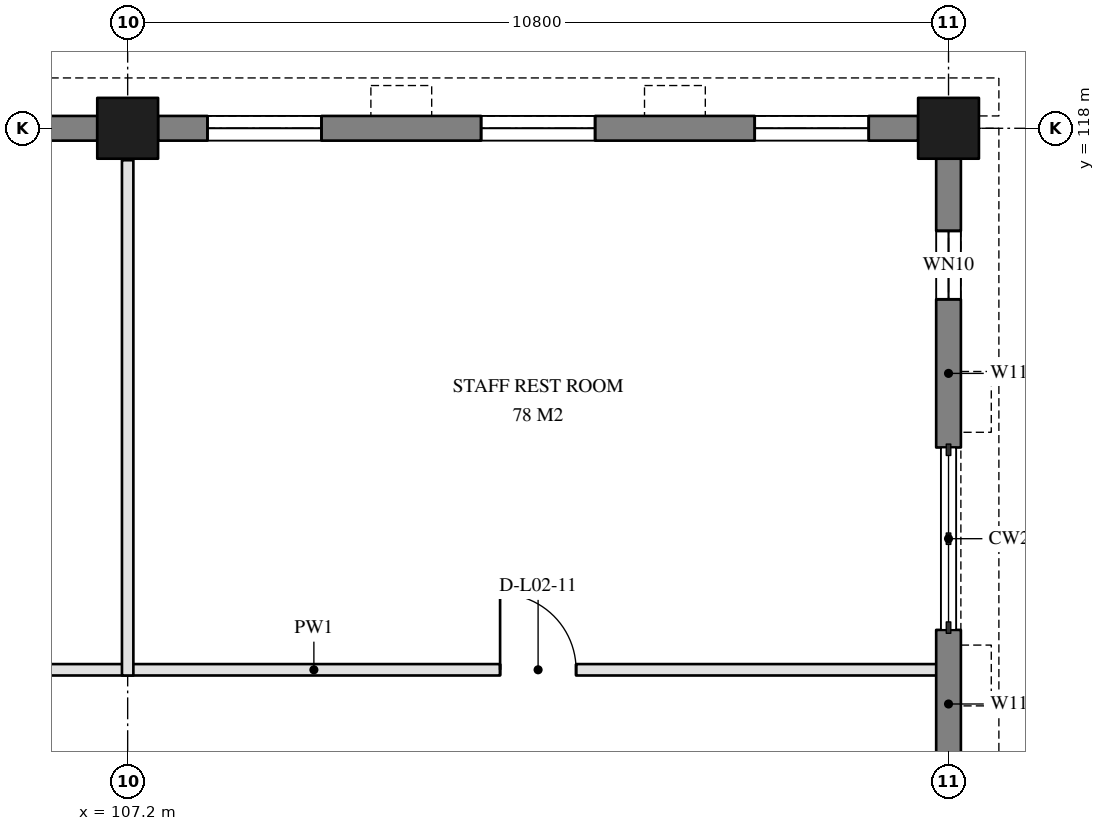
"""IFC4 building model, lengths in metres.
Left out: names, types, materials, properties, quantities, classifications, styles, units other than length and angle.
Written with IfcOpenShell. Run it as: python <this file> out.ifc"""

import sys

from ifc_helpers import new_model, si_unit, direction, frame, frame_2d, origin, origin_2d, place, context, subcontext, project, spatial, rectangle, extrude, element, fill, save


model = new_model("IFC4")
c1 = context("Model", 3, precision=1e-05, world=origin(), true_north=direction((0.0, 1.0)))
c2 = subcontext(c1, "Body", "Model", "MODEL_VIEW")
j1 = project(units=[si_unit("LENGTHUNIT", "METRE"), si_unit("PLANEANGLEUNIT", "RADIAN")], contexts=[c1])
p1 = place(None, origin())
s1 = spatial("IfcSite", under=j1, at=p1, CompositionType="ELEMENT")
p2 = place(p1, origin())
s2 = spatial("IfcBuilding", under=s1, at=p2, CompositionType="ELEMENT")
p3 = place(p2, frame((0.0, 0.0, 8.7)))
s3 = spatial("IfcBuildingStorey", under=s2, at=p3, CompositionType="ELEMENT", Elevation=8.7)
for number, where, z_axis, x_axis in (
    (1, (107.2, 118.0, 0.0), (0.0, 0.0, 1.0), (1.0, 0.0, 0.0)),
    (2, (118.0, 118.0, 0.0), (0.0, 0.0, 1.0), (1.0, 0.0, 0.0)),
):
    element("IfcColumn", number, at=place(p3, frame(where, z_axis=z_axis, x_axis=x_axis)), inside=s3, PredefinedType="COLUMN", context=c2, shape_type="SweptSolid", body=[
        extrude(rectangle(XDim=0.8, YDim=0.8, at=origin_2d()), origin(), (0.0, 0.0, 1.0), 3.9),
    ])
p4 = place(p3, frame((103.0, 118.0, 0.0), z_axis=(0.0, 0.0, 1.0), x_axis=(1.0, 0.0, 0.0)))
e3 = element("IfcWall", 3, at=p4, inside=s3, PredefinedType="SOLIDWALL", context=c2, shape_type="SweptSolid", body=[
    extrude(rectangle(XDim=3.8, YDim=0.325, at=frame_2d((1.9, 0.0))), origin(), (0.0, 0.0, 1.0), 2.8),
])
p5 = place(p4, frame((1.65, 0.0, 0.6)))
e4 = element("IfcOpeningElement", 4, at=p5, cuts=e3, PredefinedType="OPENING", context=c2, shape_type="SweptSolid", body=[
    extrude(rectangle(XDim=1.5, YDim=2.1, at=frame_2d((0.75, 1.05))), frame((0.0, 0.172, 0.0), z_axis=(0.0, -1.0, 0.0), x_axis=(1.0, 0.0, 0.0)), (0.0, 0.0, 1.0), 0.345),
])
p6 = place(p3, frame((107.6, 118.0, 0.0), z_axis=(0.0, 0.0, 1.0), x_axis=(1.0, 0.0, 0.0)))
e5 = element("IfcWall", 5, at=p6, inside=s3, PredefinedType="SOLIDWALL", context=c2, shape_type="SweptSolid", body=[
    extrude(rectangle(XDim=10.0, YDim=0.325, at=frame_2d((5.0, 0.0))), origin(), (0.0, 0.0, 1.0), 2.8),
])
p7 = place(p6, frame((0.65, 0.0, 0.6)))
e6 = element("IfcOpeningElement", 6, at=p7, cuts=e5, PredefinedType="OPENING", context=c2, shape_type="SweptSolid", body=[
    extrude(rectangle(XDim=1.5, YDim=2.1, at=frame_2d((0.75, 1.05))), frame((0.0, 0.172, 0.0), z_axis=(0.0, -1.0, 0.0), x_axis=(1.0, 0.0, 0.0)), (0.0, 0.0, 1.0), 0.345),
])
p8 = place(p6, frame((4.25, 0.0, 0.6)))
e7 = element("IfcOpeningElement", 7, at=p8, cuts=e5, PredefinedType="OPENING", context=c2, shape_type="SweptSolid", body=[
    extrude(rectangle(XDim=1.5, YDim=2.1, at=frame_2d((0.75, 1.05))), frame((0.0, 0.172, 0.0), z_axis=(0.0, -1.0, 0.0), x_axis=(1.0, 0.0, 0.0)), (0.0, 0.0, 1.0), 0.345),
])
p9 = place(p6, frame((7.85, 0.0, 0.6)))
e8 = element("IfcOpeningElement", 8, at=p9, cuts=e5, PredefinedType="OPENING", context=c2, shape_type="SweptSolid", body=[
    extrude(rectangle(XDim=1.5, YDim=2.1, at=frame_2d((0.75, 1.05))), frame((0.0, 0.172, 0.0), z_axis=(0.0, -1.0, 0.0), x_axis=(1.0, 0.0, 0.0)), (0.0, 0.0, 1.0), 0.345),
])
p10 = place(p3, frame((118.0, 107.6, 0.0), z_axis=(0.0, 0.0, 1.0), x_axis=(0.0, 1.0, 0.0)))
e9 = element("IfcWall", 9, at=p10, inside=s3, PredefinedType="SOLIDWALL", context=c2, shape_type="SweptSolid", body=[
    extrude(rectangle(XDim=3.8, YDim=0.325, at=frame_2d((1.9, 0.0))), origin(), (0.0, 0.0, 1.0), 2.8),
])
p11 = place(p10, frame((0.95, 0.0, 0.7)))
e10 = element("IfcOpeningElement", 10, at=p11, cuts=e9, PredefinedType="OPENING", context=c2, shape_type="SweptSolid", body=[
    extrude(rectangle(XDim=0.9, YDim=2.0, at=frame_2d((0.45, 1.0))), frame((0.0, 0.172, 0.0), z_axis=(0.0, -1.0, 0.0), x_axis=(1.0, 0.0, 0.0)), (0.0, 0.0, 1.0), 0.345),
])
p12 = place(p3, frame((118.0, 113.8, 0.0), z_axis=(0.0, 0.0, 1.0), x_axis=(0.0, 1.0, 0.0)))
e11 = element("IfcWall", 11, at=p12, inside=s3, PredefinedType="SOLIDWALL", context=c2, shape_type="SweptSolid", body=[
    extrude(rectangle(XDim=3.8, YDim=0.325, at=frame_2d((1.9, 0.0))), origin(), (0.0, 0.0, 1.0), 2.8),
])
p13 = place(p12, frame((1.95, 0.0, 0.7)))
e12 = element("IfcOpeningElement", 12, at=p13, cuts=e11, PredefinedType="OPENING", context=c2, shape_type="SweptSolid", body=[
    extrude(rectangle(XDim=0.9, YDim=2.0, at=frame_2d((0.45, 1.0))), frame((0.0, 0.172, 0.0), z_axis=(0.0, -1.0, 0.0), x_axis=(1.0, 0.0, 0.0)), (0.0, 0.0, 1.0), 0.345),
])
p14 = place(p3, frame((92.8, 110.875, 0.0), z_axis=(0.0, 0.0, 1.0), x_axis=(1.0, 0.0, 0.0)))
e13 = element("IfcWall", 13, at=p14, inside=s3, PredefinedType="PARTITIONING", context=c2, shape_type="SweptSolid", body=[
    extrude(rectangle(XDim=14.4, YDim=0.15, at=frame_2d((7.2, 0.0))), origin(), (0.0, 0.0, 1.0), 2.8),
])
p15 = place(p14, frame((6.3, 0.0, 0.0)))
e14 = element("IfcOpeningElement", 14, at=p15, cuts=e13, PredefinedType="OPENING", context=c2, shape_type="SweptSolid", body=[
    extrude(rectangle(XDim=1.8, YDim=2.1, at=frame_2d((0.9, 1.05))), frame((0.0, 0.085, 0.0), z_axis=(0.0, -1.0, 0.0), x_axis=(1.0, 0.0, 0.0)), (0.0, 0.0, 1.0), 0.17),
])
p16 = place(p3, frame((107.2, 110.875, 0.0), z_axis=(0.0, 0.0, 1.0), x_axis=(1.0, 0.0, 0.0)))
e15 = element("IfcWall", 15, at=p16, inside=s3, PredefinedType="PARTITIONING", context=c2, shape_type="SweptSolid", body=[
    extrude(rectangle(XDim=10.8, YDim=0.15, at=frame_2d((5.4, 0.0))), origin(), (0.0, 0.0, 1.0), 2.8),
])
p17 = place(p16, frame((4.9, 0.0, 0.0)))
e16 = element("IfcOpeningElement", 16, at=p17, cuts=e15, PredefinedType="OPENING", context=c2, shape_type="SweptSolid", body=[
    extrude(rectangle(XDim=1.0, YDim=2.1, at=frame_2d((0.5, 1.05))), frame((0.0, 0.085, 0.0), z_axis=(0.0, -1.0, 0.0), x_axis=(1.0, 0.0, 0.0)), (0.0, 0.0, 1.0), 0.17),
])
p18 = place(p3, frame((107.2, 110.8, 0.0), z_axis=(0.0, 0.0, 1.0), x_axis=(0.0, 1.0, 0.0)))
e17 = element("IfcWall", 17, at=p18, inside=s3, PredefinedType="PARTITIONING", context=c2, shape_type="SweptSolid", body=[
    extrude(rectangle(XDim=6.78, YDim=0.15, at=frame_2d((3.39, 0.0))), origin(), (0.0, 0.0, 1.0), 2.8),
])
p19 = place(p7, origin())
e18 = element("IfcWindow", 18, at=p19, inside=s3, PartitioningType="SINGLE_PANEL", PredefinedType="WINDOW", context=c2, shape_type="SweptSolid", body=[
    extrude(rectangle(XDim=1.5, YDim=2.1, at=frame_2d((0.75, 1.05))), frame((0.0, 0.03, 0.0), z_axis=(0.0, -1.0, 0.0), x_axis=(1.0, 0.0, 0.0)), (0.0, 0.0, 1.0), 0.06),
])
fill(e6, e18)
p20 = place(p8, origin())
e19 = element("IfcWindow", 19, at=p20, inside=s3, PartitioningType="SINGLE_PANEL", PredefinedType="WINDOW", context=c2, shape_type="SweptSolid", body=[
    extrude(rectangle(XDim=1.5, YDim=2.1, at=frame_2d((0.75, 1.05))), frame((0.0, 0.03, 0.0), z_axis=(0.0, -1.0, 0.0), x_axis=(1.0, 0.0, 0.0)), (0.0, 0.0, 1.0), 0.06),
])
fill(e7, e19)
p21 = place(p9, origin())
e20 = element("IfcWindow", 20, at=p21, inside=s3, PartitioningType="SINGLE_PANEL", PredefinedType="WINDOW", context=c2, shape_type="SweptSolid", body=[
    extrude(rectangle(XDim=1.5, YDim=2.1, at=frame_2d((0.75, 1.05))), frame((0.0, 0.03, 0.0), z_axis=(0.0, -1.0, 0.0), x_axis=(1.0, 0.0, 0.0)), (0.0, 0.0, 1.0), 0.06),
])
fill(e8, e20)
p22 = place(p13, origin())
e21 = element("IfcWindow", 21, at=p22, inside=s3, PartitioningType="SINGLE_PANEL", PredefinedType="WINDOW", context=c2, shape_type="SweptSolid", body=[
    extrude(rectangle(XDim=0.9, YDim=2.0, at=frame_2d((0.45, 1.0))), frame((0.0, 0.03, 0.0), z_axis=(0.0, -1.0, 0.0), x_axis=(1.0, 0.0, 0.0)), (0.0, 0.0, 1.0), 0.06),
])
fill(e12, e21)
p23 = place(p17, origin())
e22 = element("IfcDoor", 22, at=p23, inside=s3, OperationType="SINGLE_SWING_LEFT", PredefinedType="DOOR", context=c2, shape_type="SweptSolid", body=[
    extrude(rectangle(XDim=1.0, YDim=2.1, at=frame_2d((0.5, 1.05))), frame((0.0, 0.025, 0.0), z_axis=(0.0, -1.0, 0.0), x_axis=(1.0, 0.0, 0.0)), (0.0, 0.0, 1.0), 0.05),
])
fill(e16, e22)
save(model, sys.argv[1])
